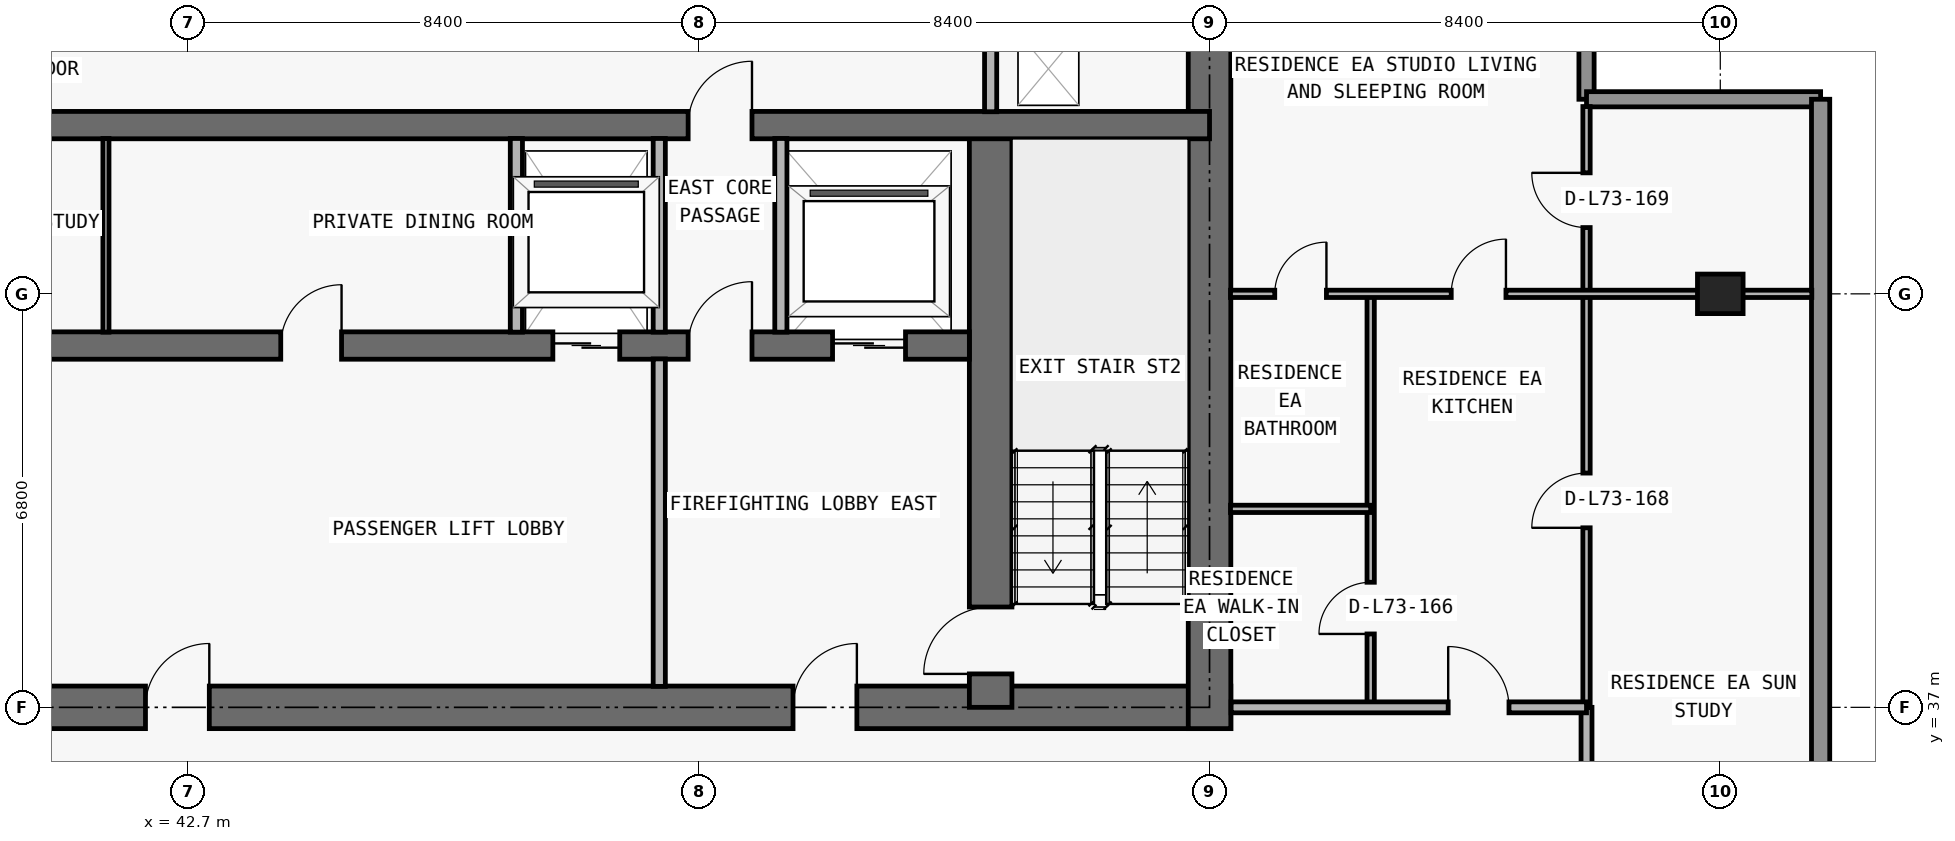
"""IFC4 building model, lengths in metres.
Left out: names, types, materials, properties, quantities, classifications, styles, units other than length and angle.
Written with IfcOpenShell. Run it as: python <this file> out.ifc"""

import sys

from ifc_helpers import new_model, si_unit, direction, frame, frame_2d, origin, origin_2d, place, context, subcontext, project, spatial, rectangle, extrude, element, fill, save


model = new_model("IFC4")
c1 = context("Model", 3, precision=1e-05, world=origin(), true_north=direction((0.0, 1.0)))
c2 = subcontext(c1, "Body", "Model", "MODEL_VIEW")
j1 = project(units=[si_unit("LENGTHUNIT", "METRE"), si_unit("PLANEANGLEUNIT", "RADIAN")], contexts=[c1])
p1 = place(None, origin())
s1 = spatial("IfcSite", under=j1, at=p1, CompositionType="ELEMENT")
p2 = place(p1, origin())
s2 = spatial("IfcBuilding", under=s1, at=p2, CompositionType="ELEMENT")
p3 = place(p2, frame((0.0, 0.0, 259.5)))
s3 = spatial("IfcBuildingStorey", under=s2, at=p3, CompositionType="ELEMENT", Elevation=259.5)
p4 = place(p3, frame((67.9, 43.8, 0.0), z_axis=(0.0, 0.0, 1.0), x_axis=(1.0, 0.0, 0.0)))
e1 = element("IfcColumn", 1, at=p4, inside=s3, PredefinedType="COLUMN", context=c2, shape_type="SweptSolid", body=[
    extrude(rectangle(XDim=0.75, YDim=0.65, at=origin_2d()), origin(), (0.0, 0.0, 1.0), 3.05),
])
p5 = place(p3, frame((17.95, 37.0, 0.0), z_axis=(0.0, 0.0, 1.0), x_axis=(1.0, 0.0, 0.0)))
e2 = element("IfcWall", 2, at=p5, inside=s3, PredefinedType="SHEAR", context=c2, shape_type="SweptSolid", body=[
    extrude(rectangle(XDim=41.9, YDim=0.7, at=frame_2d((20.95, 0.0))), origin(), (0.0, 0.0, 1.0), 3.05),
])
p6 = place(p5, frame((14.35, 0.0, 0.0)))
e3 = element("IfcOpeningElement", 3, at=p6, cuts=e2, PredefinedType="OPENING", context=c2, shape_type="SweptSolid", body=[
    extrude(rectangle(XDim=1.1, YDim=2.15, at=frame_2d((0.55, 1.075))), frame((0.0, 0.36, 0.0), z_axis=(0.0, -1.0, 0.0), x_axis=(1.0, 0.0, 0.0)), (0.0, 0.0, 1.0), 0.72),
])
p7 = place(p5, frame((6.2, 0.0, 0.0)))
e4 = element("IfcOpeningElement", 4, at=p7, cuts=e2, PredefinedType="OPENING", context=c2, shape_type="SweptSolid", body=[
    extrude(rectangle(XDim=1.05, YDim=2.15, at=frame_2d((0.525, 1.075))), frame((0.0, 0.36, 0.0), z_axis=(0.0, -1.0, 0.0), x_axis=(1.0, 0.0, 0.0)), (0.0, 0.0, 1.0), 0.72),
])
p8 = place(p5, frame((34.7, 0.0, 0.0)))
e5 = element("IfcOpeningElement", 5, at=p8, cuts=e2, PredefinedType="OPENING", context=c2, shape_type="SweptSolid", body=[
    extrude(rectangle(XDim=1.05, YDim=2.15, at=frame_2d((0.525, 1.075))), frame((0.0, 0.36, 0.0), z_axis=(0.0, -1.0, 0.0), x_axis=(1.0, 0.0, 0.0)), (0.0, 0.0, 1.0), 0.72),
])
p9 = place(p5, frame((10.812, 0.0, 0.0)))
e6 = element("IfcOpeningElement", 6, at=p9, cuts=e2, PredefinedType="OPENING", context=c2, shape_type="SweptSolid", body=[
    extrude(rectangle(XDim=1.05, YDim=2.15, at=frame_2d((0.525, 1.075))), frame((0.0, 0.36, 0.0), z_axis=(0.0, -1.0, 0.0), x_axis=(1.0, 0.0, 0.0)), (0.0, 0.0, 1.0), 0.72),
])
p10 = place(p5, frame((24.05, 0.0, 0.0)))
e7 = element("IfcOpeningElement", 7, at=p10, cuts=e2, PredefinedType="OPENING", context=c2, shape_type="SweptSolid", body=[
    extrude(rectangle(XDim=1.05, YDim=2.15, at=frame_2d((0.525, 1.075))), frame((0.0, 0.36, 0.0), z_axis=(0.0, -1.0, 0.0), x_axis=(1.0, 0.0, 0.0)), (0.0, 0.0, 1.0), 0.72),
])
p11 = place(p3, frame((59.5, 36.65, 0.0), z_axis=(0.0, 0.0, 1.0), x_axis=(0.0, 1.0, 0.0)))
e8 = element("IfcWall", 8, at=p11, inside=s3, PredefinedType="SHEAR", context=c2, shape_type="SweptSolid", body=[
    extrude(rectangle(XDim=13.95, YDim=0.7, at=frame_2d((6.975, 0.0))), origin(), (0.0, 0.0, 1.0), 3.05),
])
p12 = place(p3, frame((55.9, 37.0, 0.0), z_axis=(0.0, 0.0, 1.0), x_axis=(0.0, 1.0, 0.0)))
e9 = element("IfcWall", 9, at=p12, inside=s3, PredefinedType="SHEAR", context=c2, shape_type="SweptSolid", body=[
    extrude(rectangle(XDim=9.575, YDim=0.7, at=frame_2d((4.788, 0.0))), origin(), (0.0, 0.0, 1.0), 3.05),
])
p13 = place(p12, frame((0.55, 0.0, 0.0)))
e10 = element("IfcOpeningElement", 10, at=p13, cuts=e9, PredefinedType="OPENING", context=c2, shape_type="SweptSolid", body=[
    extrude(rectangle(XDim=1.1, YDim=2.15, at=frame_2d((0.55, 1.075))), frame((0.0, 0.36, 0.0), z_axis=(0.0, -1.0, 0.0), x_axis=(1.0, 0.0, 0.0)), (0.0, 0.0, 1.0), 0.72),
])
p14 = place(p3, frame((22.25, 42.95, 0.0), z_axis=(0.0, 0.0, 1.0), x_axis=(1.0, 0.0, 0.0)))
e11 = element("IfcWall", 11, at=p14, inside=s3, PredefinedType="SHEAR", context=c2, shape_type="SweptSolid", body=[
    extrude(rectangle(XDim=33.3, YDim=0.45, at=frame_2d((16.65, 0.0))), origin(), (0.0, 0.0, 1.0), 3.05),
])
p15 = place(p14, frame((1.05, 0.0, 0.0)))
e12 = element("IfcOpeningElement", 12, at=p15, cuts=e11, PredefinedType="OPENING", context=c2, shape_type="SweptSolid", body=[
    extrude(rectangle(XDim=1.2, YDim=2.2, at=frame_2d((0.6, 1.1))), frame((0.0, 0.235, 0.0), z_axis=(0.0, -1.0, 0.0), x_axis=(1.0, 0.0, 0.0)), (0.0, 0.0, 1.0), 0.47),
])
p16 = place(p14, frame((31.05, 0.0, 0.0)))
e13 = element("IfcOpeningElement", 13, at=p16, cuts=e11, PredefinedType="OPENING", context=c2, shape_type="SweptSolid", body=[
    extrude(rectangle(XDim=1.2, YDim=2.2, at=frame_2d((0.6, 1.1))), frame((0.0, 0.235, 0.0), z_axis=(0.0, -1.0, 0.0), x_axis=(1.0, 0.0, 0.0)), (0.0, 0.0, 1.0), 0.47),
])
p17 = place(p14, frame((26.45, 0.0, 0.0)))
e14 = element("IfcOpeningElement", 14, at=p17, cuts=e11, PredefinedType="OPENING", context=c2, shape_type="SweptSolid", body=[
    extrude(rectangle(XDim=1.1, YDim=2.2, at=frame_2d((0.55, 1.1))), frame((0.0, 0.235, 0.0), z_axis=(0.0, -1.0, 0.0), x_axis=(1.0, 0.0, 0.0)), (0.0, 0.0, 1.0), 0.47),
])
p18 = place(p14, frame((5.95, 0.0, 0.0)))
e15 = element("IfcOpeningElement", 15, at=p18, cuts=e11, PredefinedType="OPENING", context=c2, shape_type="SweptSolid", body=[
    extrude(rectangle(XDim=1.1, YDim=2.2, at=frame_2d((0.55, 1.1))), frame((0.0, 0.235, 0.0), z_axis=(0.0, -1.0, 0.0), x_axis=(1.0, 0.0, 0.0)), (0.0, 0.0, 1.0), 0.47),
])
p19 = place(p14, frame((3.625, 0.0, 0.0)))
e16 = element("IfcOpeningElement", 16, at=p19, cuts=e11, PredefinedType="OPENING", context=c2, shape_type="SweptSolid", body=[
    extrude(rectangle(XDim=1.05, YDim=2.15, at=frame_2d((0.525, 1.075))), frame((0.0, 0.235, 0.0), z_axis=(0.0, -1.0, 0.0), x_axis=(1.0, 0.0, 0.0)), (0.0, 0.0, 1.0), 0.47),
])
p20 = place(p14, frame((28.675, 0.0, 0.0)))
e17 = element("IfcOpeningElement", 17, at=p20, cuts=e11, PredefinedType="OPENING", context=c2, shape_type="SweptSolid", body=[
    extrude(rectangle(XDim=1.05, YDim=2.15, at=frame_2d((0.525, 1.075))), frame((0.0, 0.235, 0.0), z_axis=(0.0, -1.0, 0.0), x_axis=(1.0, 0.0, 0.0)), (0.0, 0.0, 1.0), 0.47),
])
p21 = place(p14, frame((15.225, 0.0, 0.0)))
e18 = element("IfcOpeningElement", 18, at=p21, cuts=e11, PredefinedType="OPENING", context=c2, shape_type="SweptSolid", body=[
    extrude(rectangle(XDim=1.0, YDim=2.2, at=frame_2d((0.5, 1.1))), frame((0.0, 0.235, 0.0), z_axis=(0.0, -1.0, 0.0), x_axis=(1.0, 0.0, 0.0)), (0.0, 0.0, 1.0), 0.47),
])
p22 = place(p14, frame((21.975, 0.0, 0.0)))
e19 = element("IfcOpeningElement", 19, at=p22, cuts=e11, PredefinedType="OPENING", context=c2, shape_type="SweptSolid", body=[
    extrude(rectangle(XDim=1.0, YDim=2.2, at=frame_2d((0.5, 1.1))), frame((0.0, 0.235, 0.0), z_axis=(0.0, -1.0, 0.0), x_axis=(1.0, 0.0, 0.0)), (0.0, 0.0, 1.0), 0.47),
])
p23 = place(p3, frame((18.3, 46.575, 0.0), z_axis=(0.0, 0.0, 1.0), x_axis=(1.0, 0.0, 0.0)))
e20 = element("IfcWall", 20, at=p23, inside=s3, PredefinedType="SHEAR", context=c2, shape_type="SweptSolid", body=[
    extrude(rectangle(XDim=41.2, YDim=0.45, at=frame_2d((20.6, 0.0))), origin(), (0.0, 0.0, 1.0), 3.05),
])
p24 = place(p23, frame((7.575, 0.0, 0.0)))
e21 = element("IfcOpeningElement", 21, at=p24, cuts=e20, PredefinedType="OPENING", context=c2, shape_type="SweptSolid", body=[
    extrude(rectangle(XDim=1.05, YDim=2.15, at=frame_2d((0.525, 1.075))), frame((0.0, 0.235, 0.0), z_axis=(0.0, -1.0, 0.0), x_axis=(1.0, 0.0, 0.0)), (0.0, 0.0, 1.0), 0.47),
])
p25 = place(p23, frame((32.625, 0.0, 0.0)))
e22 = element("IfcOpeningElement", 22, at=p25, cuts=e20, PredefinedType="OPENING", context=c2, shape_type="SweptSolid", body=[
    extrude(rectangle(XDim=1.05, YDim=2.15, at=frame_2d((0.525, 1.075))), frame((0.0, 0.235, 0.0), z_axis=(0.0, -1.0, 0.0), x_axis=(1.0, 0.0, 0.0)), (0.0, 0.0, 1.0), 0.47),
])
p26 = place(p3, frame((65.7, 50.45, 0.0), z_axis=(0.0, 0.0, 1.0), x_axis=(0.0, -1.0, 0.0)))
e23 = element("IfcWall", 23, at=p26, inside=s3, PredefinedType="ELEMENTEDWALL", context=c2, shape_type="SweptSolid", body=[
    extrude(rectangle(XDim=3.45, YDim=0.25, at=frame_2d((1.725, 0.0))), origin(), (0.0, 0.0, 1.0), 3.05),
])
p27 = place(p3, frame((65.7, 47.0, 0.0), z_axis=(0.0, 0.0, 1.0), x_axis=(1.0, 0.0, 0.0)))
e24 = element("IfcWall", 24, at=p27, inside=s3, PredefinedType="ELEMENTEDWALL", context=c2, shape_type="SweptSolid", body=[
    extrude(rectangle(XDim=3.85, YDim=0.25, at=frame_2d((1.925, 0.0))), origin(), (0.0, 0.0, 1.0), 3.05),
])
p28 = place(p3, frame((69.55, 47.0, 0.0), z_axis=(0.0, 0.0, 1.0), x_axis=(0.0, -1.0, 0.0)))
e25 = element("IfcWall", 25, at=p28, inside=s3, PredefinedType="STANDARD", context=c2, shape_type="SweptSolid", body=[
    extrude(rectangle(XDim=16.85, YDim=0.3, at=frame_2d((8.425, 0.0))), origin(), (0.0, 0.0, 1.0), 3.05),
])
p29 = place(p3, frame((41.35, 43.17, 0.0), z_axis=(0.0, 0.0, 1.0), x_axis=(0.0, 1.0, 0.0)))
e26 = element("IfcWall", 26, at=p29, inside=s3, PredefinedType="MOVABLE", context=c2, shape_type="SweptSolid", body=[
    extrude(rectangle(XDim=3.185, YDim=0.1, at=frame_2d((1.593, 0.0))), origin(), (0.0, 0.0, 1.0), 3.05),
])
p30 = place(p3, frame((48.1, 43.17, 0.0), z_axis=(0.0, 0.0, 1.0), x_axis=(0.0, 1.0, 0.0)))
e27 = element("IfcWall", 27, at=p30, inside=s3, PredefinedType="PARTITIONING", context=c2, shape_type="SweptSolid", body=[
    extrude(rectangle(XDim=3.185, YDim=0.2, at=frame_2d((1.593, 0.0))), origin(), (0.0, 0.0, 1.0), 3.05),
])
p31 = place(p3, frame((50.45, 37.345, 0.0), z_axis=(0.0, 0.0, 1.0), x_axis=(0.0, 1.0, 0.0)))
e28 = element("IfcWall", 28, at=p31, inside=s3, PredefinedType="PARTITIONING", context=c2, shape_type="SweptSolid", body=[
    extrude(rectangle(XDim=5.385, YDim=0.2, at=frame_2d((2.692, 0.0))), origin(), (0.0, 0.0, 1.0), 3.05),
])
for number, where, z_axis, x_axis in (
    (29, (50.45, 43.17, 0.0), (0.0, 0.0, 1.0), (0.0, 1.0, 0.0)),
    (30, (52.45, 43.17, 0.0), (0.0, 0.0, 1.0), (0.0, 1.0, 0.0)),
):
    element("IfcWall", number, at=place(p3, frame(where, z_axis=z_axis, x_axis=x_axis)), inside=s3, PredefinedType="PARTITIONING", context=c2, shape_type="SweptSolid", body=[
        extrude(rectangle(XDim=3.185, YDim=0.2, at=frame_2d((1.593, 0.0))), origin(), (0.0, 0.0, 1.0), 3.05),
    ])
p32 = place(p3, frame((55.9, 46.795, 0.0), z_axis=(0.0, 0.0, 1.0), x_axis=(0.0, 1.0, 0.0)))
e31 = element("IfcWall", 31, at=p32, inside=s3, PredefinedType="PARTITIONING", context=c2, shape_type="SweptSolid", body=[
    extrude(rectangle(XDim=3.16, YDim=0.2, at=frame_2d((1.58, 0.0))), origin(), (0.0, 0.0, 1.0), 3.05),
])
p33 = place(p3, frame((62.15, 37.0, 0.0), z_axis=(0.0, 0.0, 1.0), x_axis=(0.0, 1.0, 0.0)))
e32 = element("IfcWall", 32, at=p33, inside=s3, PredefinedType="PARTITIONING", context=c2, shape_type="SweptSolid", body=[
    extrude(rectangle(XDim=6.8, YDim=0.12, at=frame_2d((3.4, 0.0))), origin(), (0.0, 0.0, 1.0), 3.05),
])
p34 = place(p33, frame((1.207, 0.0, 0.0)))
e33 = element("IfcOpeningElement", 33, at=p34, cuts=e32, PredefinedType="OPENING", context=c2, shape_type="SweptSolid", body=[
    extrude(rectangle(XDim=0.85, YDim=2.1, at=frame_2d((0.425, 1.05))), frame((0.0, 0.07, 0.0), z_axis=(0.0, -1.0, 0.0), x_axis=(1.0, 0.0, 0.0)), (0.0, 0.0, 1.0), 0.14),
])
p35 = place(p3, frame((65.7, 34.305, 0.0), z_axis=(0.0, 0.0, 1.0), x_axis=(0.0, 1.0, 0.0)))
e34 = element("IfcWall", 34, at=p35, inside=s3, PredefinedType="PARTITIONING", context=c2, shape_type="SweptSolid", body=[
    extrude(rectangle(XDim=2.695, YDim=0.18, at=frame_2d((1.348, 0.0))), origin(), (0.0, 0.0, 1.0), 2.629),
])
p36 = place(p3, frame((65.7, 37.005, 0.0), z_axis=(0.0, 0.0, 1.0), x_axis=(0.0, 1.0, 0.0)))
e35 = element("IfcWall", 35, at=p36, inside=s3, PredefinedType="PARTITIONING", context=c2, shape_type="SweptSolid", body=[
    extrude(rectangle(XDim=9.875, YDim=0.12, at=frame_2d((4.938, 0.0))), origin(), (0.0, 0.0, 1.0), 2.629),
])
p37 = place(p36, frame((2.948, 0.0, 0.0)))
e36 = element("IfcOpeningElement", 36, at=p37, cuts=e35, PredefinedType="OPENING", context=c2, shape_type="SweptSolid", body=[
    extrude(rectangle(XDim=0.9, YDim=2.15, at=frame_2d((0.45, 1.075))), frame((0.0, 0.07, 0.0), z_axis=(0.0, -1.0, 0.0), x_axis=(1.0, 0.0, 0.0)), (0.0, 0.0, 1.0), 0.14),
])
p38 = place(p36, frame((7.885, 0.0, 0.0)))
e37 = element("IfcOpeningElement", 37, at=p38, cuts=e35, PredefinedType="OPENING", context=c2, shape_type="SweptSolid", body=[
    extrude(rectangle(XDim=0.9, YDim=2.15, at=frame_2d((0.45, 1.075))), frame((0.0, 0.07, 0.0), z_axis=(0.0, -1.0, 0.0), x_axis=(1.0, 0.0, 0.0)), (0.0, 0.0, 1.0), 0.14),
])
p39 = place(p3, frame((59.855, 37.0, 0.0), z_axis=(0.0, 0.0, 1.0), x_axis=(1.0, 0.0, 0.0)))
e38 = element("IfcWall", 38, at=p39, inside=s3, PredefinedType="PARTITIONING", context=c2, shape_type="SweptSolid", body=[
    extrude(rectangle(XDim=5.845, YDim=0.18, at=frame_2d((2.922, 0.0))), origin(), (0.0, 0.0, 1.0), 3.05),
])
p40 = place(p39, frame((3.57, 0.0, 0.0)))
e39 = element("IfcOpeningElement", 39, at=p40, cuts=e38, PredefinedType="OPENING", context=c2, shape_type="SweptSolid", body=[
    extrude(rectangle(XDim=1.0, YDim=2.2, at=frame_2d((0.5, 1.1))), frame((0.0, 0.1, 0.0), z_axis=(0.0, -1.0, 0.0), x_axis=(1.0, 0.0, 0.0)), (0.0, 0.0, 1.0), 0.2),
])
p41 = place(p3, frame((59.845, 40.264, 0.0), z_axis=(0.0, 0.0, 1.0), x_axis=(1.0, 0.0, 0.0)))
e40 = element("IfcWall", 40, at=p41, inside=s3, PredefinedType="PARTITIONING", context=c2, shape_type="SweptSolid", body=[
    extrude(rectangle(XDim=2.305, YDim=0.12, at=frame_2d((1.152, 0.0))), origin(), (0.0, 0.0, 1.0), 3.05),
])
p42 = place(p3, frame((59.845, 43.8, 0.0), z_axis=(0.0, 0.0, 1.0), x_axis=(1.0, 0.0, 0.0)))
e41 = element("IfcWall", 41, at=p42, inside=s3, PredefinedType="PARTITIONING", context=c2, shape_type="SweptSolid", body=[
    extrude(rectangle(XDim=9.56, YDim=0.12, at=frame_2d((4.78, 0.0))), origin(), (0.0, 0.0, 1.0), 2.418),
])
p43 = place(p42, frame((3.63, 0.0, 0.0)))
e42 = element("IfcOpeningElement", 42, at=p43, cuts=e41, PredefinedType="OPENING", context=c2, shape_type="SweptSolid", body=[
    extrude(rectangle(XDim=0.9, YDim=2.15, at=frame_2d((0.45, 1.075))), frame((0.0, 0.07, 0.0), z_axis=(0.0, -1.0, 0.0), x_axis=(1.0, 0.0, 0.0)), (0.0, 0.0, 1.0), 0.14),
])
p44 = place(p42, frame((0.728, 0.0, 0.0)))
e43 = element("IfcOpeningElement", 43, at=p44, cuts=e41, PredefinedType="OPENING", context=c2, shape_type="SweptSolid", body=[
    extrude(rectangle(XDim=0.85, YDim=2.1, at=frame_2d((0.425, 1.05))), frame((0.0, 0.07, 0.0), z_axis=(0.0, -1.0, 0.0), x_axis=(1.0, 0.0, 0.0)), (0.0, 0.0, 1.0), 0.14),
])
p45 = place(p16, origin())
e44 = element("IfcDoor", 44, at=p45, inside=s3, OperationType="DOUBLE_DOOR_SLIDING", PredefinedType="DOOR", context=c2, shape_type="SweptSolid", body=[
    extrude(rectangle(XDim=1.2, YDim=2.2, at=frame_2d((0.6, 1.1))), frame((0.0, 0.025, 0.0), z_axis=(0.0, -1.0, 0.0), x_axis=(1.0, 0.0, 0.0)), (0.0, 0.0, 1.0), 0.05),
])
fill(e13, e44)
p46 = place(p17, origin())
e45 = element("IfcDoor", 45, at=p46, inside=s3, OperationType="DOUBLE_DOOR_SLIDING", PredefinedType="DOOR", context=c2, shape_type="SweptSolid", body=[
    extrude(rectangle(XDim=1.1, YDim=2.2, at=frame_2d((0.55, 1.1))), frame((0.0, 0.025, 0.0), z_axis=(0.0, -1.0, 0.0), x_axis=(1.0, 0.0, 0.0)), (0.0, 0.0, 1.0), 0.05),
])
fill(e14, e45)
p47 = place(p8, origin())
e46 = element("IfcDoor", 46, at=p47, inside=s3, OperationType="SINGLE_SWING_RIGHT", PredefinedType="DOOR", context=c2, shape_type="SweptSolid", body=[
    extrude(rectangle(XDim=1.05, YDim=2.15, at=frame_2d((0.525, 1.075))), frame((0.0, 0.025, 0.0), z_axis=(0.0, -1.0, 0.0), x_axis=(1.0, 0.0, 0.0)), (0.0, 0.0, 1.0), 0.05),
])
fill(e5, e46)
p48 = place(p13, origin())
e47 = element("IfcDoor", 47, at=p48, inside=s3, OperationType="SINGLE_SWING_LEFT", PredefinedType="DOOR", context=c2, shape_type="SweptSolid", body=[
    extrude(rectangle(XDim=1.1, YDim=2.15, at=frame_2d((0.55, 1.075))), frame((0.0, 0.025, 0.0), z_axis=(0.0, -1.0, 0.0), x_axis=(1.0, 0.0, 0.0)), (0.0, 0.0, 1.0), 0.05),
])
fill(e10, e47)
p49 = place(p20, origin())
e48 = element("IfcDoor", 48, at=p49, inside=s3, OperationType="SINGLE_SWING_RIGHT", PredefinedType="DOOR", context=c2, shape_type="SweptSolid", body=[
    extrude(rectangle(XDim=1.05, YDim=2.15, at=frame_2d((0.525, 1.075))), frame((0.0, 0.025, 0.0), z_axis=(0.0, -1.0, 0.0), x_axis=(1.0, 0.0, 0.0)), (0.0, 0.0, 1.0), 0.05),
])
fill(e17, e48)
p50 = place(p10, origin())
e49 = element("IfcDoor", 49, at=p50, inside=s3, OperationType="SINGLE_SWING_RIGHT", PredefinedType="DOOR", context=c2, shape_type="SweptSolid", body=[
    extrude(rectangle(XDim=1.05, YDim=2.15, at=frame_2d((0.525, 1.075))), frame((0.0, 0.025, 0.0), z_axis=(0.0, -1.0, 0.0), x_axis=(1.0, 0.0, 0.0)), (0.0, 0.0, 1.0), 0.05),
])
fill(e7, e49)
p51 = place(p22, origin())
e50 = element("IfcDoor", 50, at=p51, inside=s3, OperationType="SINGLE_SWING_RIGHT", PredefinedType="DOOR", context=c2, shape_type="SweptSolid", body=[
    extrude(rectangle(XDim=1.0, YDim=2.2, at=frame_2d((0.5, 1.1))), frame((0.0, 0.025, 0.0), z_axis=(0.0, -1.0, 0.0), x_axis=(1.0, 0.0, 0.0)), (0.0, 0.0, 1.0), 0.05),
])
fill(e19, e50)
p52 = place(p25, origin())
e51 = element("IfcDoor", 51, at=p52, inside=s3, OperationType="SINGLE_SWING_RIGHT", PredefinedType="DOOR", context=c2, shape_type="SweptSolid", body=[
    extrude(rectangle(XDim=1.05, YDim=2.15, at=frame_2d((0.525, 1.075))), frame((0.0, 0.025, 0.0), z_axis=(0.0, -1.0, 0.0), x_axis=(1.0, 0.0, 0.0)), (0.0, 0.0, 1.0), 0.05),
])
fill(e22, e51)
p53 = place(p40, origin())
e52 = element("IfcDoor", 52, at=p53, inside=s3, OperationType="SINGLE_SWING_LEFT", PredefinedType="DOOR", context=c2, shape_type="SweptSolid", body=[
    extrude(rectangle(XDim=1.0, YDim=2.2, at=frame_2d((0.5, 1.1))), frame((0.0, 0.025, 0.0), z_axis=(0.0, -1.0, 0.0), x_axis=(1.0, 0.0, 0.0)), (0.0, 0.0, 1.0), 0.05),
])
fill(e39, e52)
p54 = place(p43, origin())
e53 = element("IfcDoor", 53, at=p54, inside=s3, OperationType="SINGLE_SWING_RIGHT", PredefinedType="DOOR", context=c2, shape_type="SweptSolid", body=[
    extrude(rectangle(XDim=0.9, YDim=2.15, at=frame_2d((0.45, 1.075))), frame((0.0, 0.025, 0.0), z_axis=(0.0, -1.0, 0.0), x_axis=(1.0, 0.0, 0.0)), (0.0, 0.0, 1.0), 0.05),
])
fill(e42, e53)
p55 = place(p34, origin())
e54 = element("IfcDoor", 54, at=p55, inside=s3, OperationType="SINGLE_SWING_LEFT", PredefinedType="DOOR", context=c2, shape_type="SweptSolid", body=[
    extrude(rectangle(XDim=0.85, YDim=2.1, at=frame_2d((0.425, 1.05))), frame((0.0, 0.025, 0.0), z_axis=(0.0, -1.0, 0.0), x_axis=(1.0, 0.0, 0.0)), (0.0, 0.0, 1.0), 0.05),
])
fill(e33, e54)
p56 = place(p44, origin())
e55 = element("IfcDoor", 55, at=p56, inside=s3, OperationType="SINGLE_SWING_RIGHT", PredefinedType="DOOR", context=c2, shape_type="SweptSolid", body=[
    extrude(rectangle(XDim=0.85, YDim=2.1, at=frame_2d((0.425, 1.05))), frame((0.0, 0.025, 0.0), z_axis=(0.0, -1.0, 0.0), x_axis=(1.0, 0.0, 0.0)), (0.0, 0.0, 1.0), 0.05),
])
fill(e43, e55)
p57 = place(p37, origin())
e56 = element("IfcDoor", 56, at=p57, inside=s3, OperationType="SINGLE_SWING_LEFT", PredefinedType="DOOR", context=c2, shape_type="SweptSolid", body=[
    extrude(rectangle(XDim=0.9, YDim=2.15, at=frame_2d((0.45, 1.075))), frame((0.0, 0.025, 0.0), z_axis=(0.0, -1.0, 0.0), x_axis=(1.0, 0.0, 0.0)), (0.0, 0.0, 1.0), 0.05),
])
fill(e36, e56)
p58 = place(p38, origin())
e57 = element("IfcDoor", 57, at=p58, inside=s3, OperationType="SINGLE_SWING_RIGHT", PredefinedType="DOOR", context=c2, shape_type="SweptSolid", body=[
    extrude(rectangle(XDim=0.9, YDim=2.15, at=frame_2d((0.45, 1.075))), frame((0.0, 0.025, 0.0), z_axis=(0.0, -1.0, 0.0), x_axis=(1.0, 0.0, 0.0)), (0.0, 0.0, 1.0), 0.05),
])
fill(e37, e57)
save(model, sys.argv[1])
